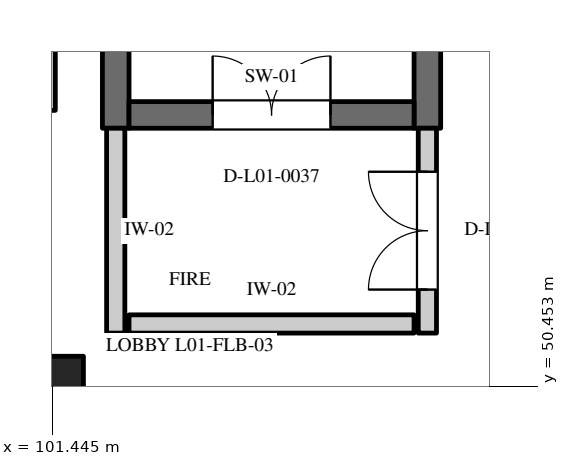
"""IFC4 building model, lengths in metres.
Left out: names, types, materials, properties, quantities, classifications, styles, units other than length and angle.
Written with IfcOpenShell. Run it as: python <this file> out.ifc"""

import sys

from ifc_helpers import new_model, si_unit, direction, frame, frame_2d, origin, origin_2d, place, context, subcontext, project, spatial, rectangle, extrude, element, fill, save


model = new_model("IFC4")
c1 = context("Model", 3, precision=1e-05, world=origin(), true_north=direction((0.0, 1.0)))
c2 = subcontext(c1, "Body", "Model", "MODEL_VIEW")
j1 = project(units=[si_unit("LENGTHUNIT", "METRE"), si_unit("PLANEANGLEUNIT", "RADIAN")], contexts=[c1])
p1 = place(None, origin())
s1 = spatial("IfcSite", under=j1, at=p1, CompositionType="ELEMENT")
p2 = place(p1, origin())
s2 = spatial("IfcBuilding", under=s1, at=p2, CompositionType="ELEMENT")
p3 = place(p2, frame((0.0, 0.0, 4.8)))
s3 = spatial("IfcBuildingStorey", under=s2, at=p3, CompositionType="ELEMENT", Elevation=4.8)
p4 = place(p3, frame((101.4, 50.4, 0.0), z_axis=(0.0, 0.0, 1.0), x_axis=(1.0, 0.0, 0.0)))
e1 = element("IfcColumn", 1, at=p4, inside=s3, PredefinedType="COLUMN", context=c2, shape_type="SweptSolid", body=[
    extrude(rectangle(XDim=0.9, YDim=0.9, at=origin_2d()), origin(), (0.0, 0.0, 1.0), 4.8),
])
for number, where, z_axis, x_axis in (
    (2, (102.275, 53.85, 0.0), (0.0, 0.0, 1.0), (0.0, 1.0, 0.0)),
    (3, (106.375, 53.85, 0.0), (0.0, 0.0, 1.0), (0.0, 1.0, 0.0)),
):
    element("IfcWall", number, at=place(p3, frame(where, z_axis=z_axis, x_axis=x_axis)), inside=s3, PredefinedType="SHEAR", context=c2, shape_type="SweptSolid", body=[
        extrude(rectangle(XDim=10.5, YDim=0.35, at=frame_2d((5.25, 0.0))), origin(), (0.0, 0.0, 1.0), 4.8),
    ])
p5 = place(p3, frame((102.45, 54.025, 0.0), z_axis=(0.0, 0.0, 1.0), x_axis=(1.0, 0.0, 0.0)))
e4 = element("IfcWall", 4, at=p5, inside=s3, PredefinedType="SHEAR", context=c2, shape_type="SweptSolid", body=[
    extrude(rectangle(XDim=3.75, YDim=0.35, at=frame_2d((1.875, 0.0))), origin(), (0.0, 0.0, 1.0), 4.45),
])
p6 = place(p5, frame((1.1, 0.0, 0.0)))
e5 = element("IfcOpeningElement", 5, at=p6, cuts=e4, PredefinedType="OPENING", context=c2, shape_type="SweptSolid", body=[
    extrude(rectangle(XDim=1.55, YDim=2.25, at=frame_2d((0.775, 1.125))), frame((0.0, 0.187, 0.0), z_axis=(0.0, -1.0, 0.0), x_axis=(1.0, 0.0, 0.0)), (0.0, 0.0, 1.0), 0.374),
])
p7 = place(p3, frame((102.275, 51.155, 0.0), z_axis=(0.0, 0.0, 1.0), x_axis=(0.0, 1.0, 0.0)))
e6 = element("IfcWall", 6, at=p7, inside=s3, PredefinedType="STANDARD", context=c2, shape_type="SweptSolid", body=[
    extrude(rectangle(XDim=2.695, YDim=0.24, at=frame_2d((1.348, 0.0))), origin(), (0.0, 0.0, 1.0), 4.45),
])
p8 = place(p3, frame((106.375, 51.155, 0.0), z_axis=(0.0, 0.0, 1.0), x_axis=(0.0, 1.0, 0.0)))
e7 = element("IfcWall", 7, at=p8, inside=s3, PredefinedType="STANDARD", context=c2, shape_type="SweptSolid", body=[
    extrude(rectangle(XDim=2.695, YDim=0.24, at=frame_2d((1.348, 0.0))), origin(), (0.0, 0.0, 1.0), 4.45),
])
p9 = place(p8, frame((0.573, 0.0, 0.0)))
e8 = element("IfcOpeningElement", 8, at=p9, cuts=e7, PredefinedType="OPENING", context=c2, shape_type="SweptSolid", body=[
    extrude(rectangle(XDim=1.55, YDim=2.25, at=frame_2d((0.775, 1.125))), frame((0.0, 0.132, 0.0), z_axis=(0.0, -1.0, 0.0), x_axis=(1.0, 0.0, 0.0)), (0.0, 0.0, 1.0), 0.264),
])
p10 = place(p3, frame((102.45, 51.275, 0.0), z_axis=(0.0, 0.0, 1.0), x_axis=(1.0, 0.0, 0.0)))
e9 = element("IfcWall", 9, at=p10, inside=s3, PredefinedType="STANDARD", context=c2, shape_type="SweptSolid", body=[
    extrude(rectangle(XDim=3.75, YDim=0.24, at=frame_2d((1.875, 0.0))), origin(), (0.0, 0.0, 1.0), 4.45),
])
p11 = place(p3, frame((101.4, 54.085, 0.0), z_axis=(0.0, 0.0, 1.0), x_axis=(0.0, 1.0, 0.0)))
e10 = element("IfcWall", 10, at=p11, inside=s3, PredefinedType="PARTITIONING", context=c2, shape_type="SweptSolid", body=[
    extrude(rectangle(XDim=29.83, YDim=0.16, at=frame_2d((14.915, 0.0))), origin(), (0.0, 0.0, 1.0), 3.7),
])
p12 = place(p6, origin())
e11 = element("IfcDoor", 11, at=p12, inside=s3, OperationType="DOUBLE_DOOR_SINGLE_SWING", PredefinedType="DOOR", context=c2, shape_type="SweptSolid", body=[
    extrude(rectangle(XDim=1.55, YDim=2.25, at=frame_2d((0.775, 1.125))), frame((0.0, 0.025, 0.0), z_axis=(0.0, -1.0, 0.0), x_axis=(1.0, 0.0, 0.0)), (0.0, 0.0, 1.0), 0.05),
])
fill(e5, e11)
p13 = place(p9, origin())
e12 = element("IfcDoor", 12, at=p13, inside=s3, OperationType="DOUBLE_DOOR_SINGLE_SWING", PredefinedType="DOOR", context=c2, shape_type="SweptSolid", body=[
    extrude(rectangle(XDim=1.55, YDim=2.25, at=frame_2d((0.775, 1.125))), frame((0.0, 0.025, 0.0), z_axis=(0.0, -1.0, 0.0), x_axis=(1.0, 0.0, 0.0)), (0.0, 0.0, 1.0), 0.05),
])
fill(e8, e12)
save(model, sys.argv[1])
